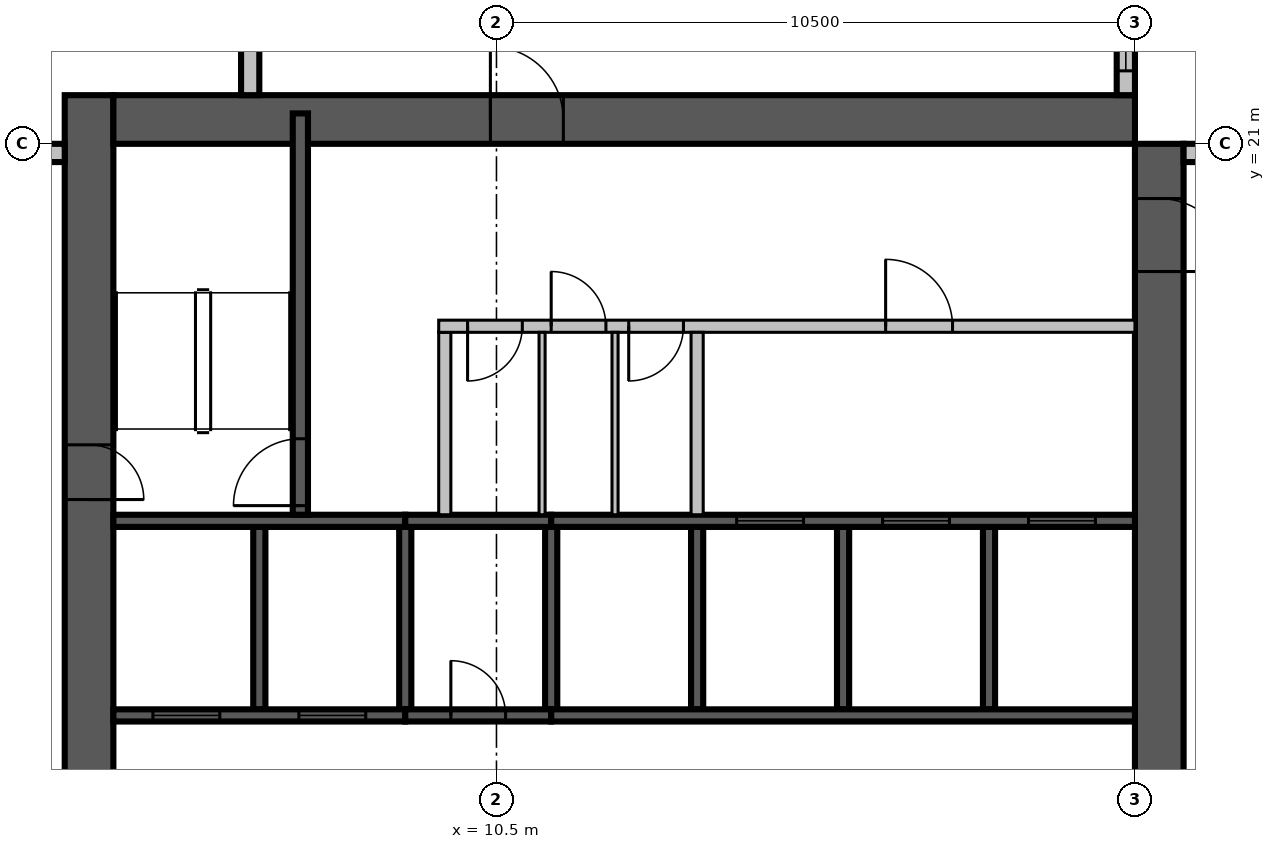
"""IFC4 building model, lengths in metres.
Left out: names, types, materials, properties, quantities, classifications, styles, units other than length and angle.
Written with IfcOpenShell. Run it as: python <this file> out.ifc"""

import sys

from ifc_helpers import new_model, si_unit, direction, frame, frame_2d, origin, place, context, subcontext, project, spatial, rectangle, extrude, source, transform, mapped, element, fill, save


model = new_model("IFC4")
c1 = context("Model", 3, precision=1e-05, world=origin(), true_north=direction((0.0, 1.0)))
c2 = subcontext(c1, "Body", "Model", "MODEL_VIEW")
j1 = project(units=[si_unit("LENGTHUNIT", "METRE"), si_unit("PLANEANGLEUNIT", "RADIAN")], contexts=[c1])
p1 = place(None, origin())
s1 = spatial("IfcSite", under=j1, at=p1, CompositionType="ELEMENT")
p2 = place(p1, origin())
s2 = spatial("IfcBuilding", under=s1, at=p2, CompositionType="ELEMENT")
p3 = place(p2, frame((0.0, 0.0, 242.4)))
s3 = spatial("IfcBuildingStorey", under=s2, at=p3, CompositionType="ELEMENT", Elevation=242.4)
m1 = source(origin(), c2, "Body", "SweptSolid", [
    extrude(rectangle(XDim=17.6, YDim=0.8, at=frame_2d((8.8, 0.0))), origin(), (0.0, 0.0, 1.0), 3.8),
])
p4 = place(p3, frame((3.8, 4.2, 0.0), z_axis=(0.0, 0.0, 1.0), x_axis=(0.0, 1.0, 0.0)))
e1 = element("IfcWall", 1, at=p4, inside=s3, PredefinedType="SHEAR", context=c2, shape_type="MappedRepresentation", body=[
    mapped(m1, transform((0.0, 0.0, 0.0), scale=1.0)),
])
m2 = source(origin(), c2, "Body", "SweptSolid", [
    extrude(rectangle(XDim=2.2, YDim=2.1, at=frame_2d((1.1, 1.05))), frame((0.0, 0.41, 0.0), z_axis=(0.0, -1.0, 0.0), x_axis=(1.0, 0.0, 0.0)), (0.0, 0.0, 1.0), 0.82),
])
p5 = place(p4, frame((4.2, 0.0, 0.0)))
e2 = element("IfcOpeningElement", 2, at=p5, cuts=e1, PredefinedType="OPENING", context=c2, shape_type="MappedRepresentation", body=[
    mapped(m2, transform((0.0, 0.0, 0.0), scale=1.0)),
])
m3 = source(origin(), c2, "Body", "SweptSolid", [
    extrude(rectangle(XDim=0.9, YDim=2.1, at=frame_2d((0.45, 1.05))), frame((0.0, 0.41, 0.0), z_axis=(0.0, -1.0, 0.0), x_axis=(1.0, 0.0, 0.0)), (0.0, 0.0, 1.0), 0.82),
])
p6 = place(p4, frame((10.95, 0.0, 0.0)))
e3 = element("IfcOpeningElement", 3, at=p6, cuts=e1, PredefinedType="OPENING", context=c2, shape_type="MappedRepresentation", body=[
    mapped(m3, transform((0.0, 0.0, 0.0), scale=1.0)),
])
m4 = source(origin(), c2, "Body", "SweptSolid", [
    extrude(rectangle(XDim=16.8, YDim=0.8, at=frame_2d((8.4, 0.0))), origin(), (0.0, 0.0, 1.0), 3.8),
])
p7 = place(p3, frame((21.4, 4.2, 0.0), z_axis=(0.0, 0.0, 1.0), x_axis=(0.0, 1.0, 0.0)))
e4 = element("IfcWall", 4, at=p7, inside=s3, PredefinedType="SHEAR", context=c2, shape_type="MappedRepresentation", body=[
    mapped(m4, transform((0.0, 0.0, 0.0), scale=1.0)),
])
p8 = place(p7, frame((4.2, 0.0, 0.0)))
e5 = element("IfcOpeningElement", 5, at=p8, cuts=e4, PredefinedType="OPENING", context=c2, shape_type="MappedRepresentation", body=[
    mapped(m2, transform((0.0, 0.0, 0.0), scale=1.0)),
])
m5 = source(origin(), c2, "Body", "SweptSolid", [
    extrude(rectangle(XDim=1.2, YDim=2.1, at=frame_2d((0.6, 1.05))), frame((0.0, 0.41, 0.0), z_axis=(0.0, -1.0, 0.0), x_axis=(1.0, 0.0, 0.0)), (0.0, 0.0, 1.0), 0.82),
])
p9 = place(p7, frame((14.7, 0.0, 0.0)))
e6 = element("IfcOpeningElement", 6, at=p9, cuts=e4, PredefinedType="OPENING", context=c2, shape_type="MappedRepresentation", body=[
    mapped(m5, transform((0.0, 0.0, 0.0), scale=1.0)),
])
p10 = place(p3, frame((4.2, 21.4, 0.0), z_axis=(0.0, 0.0, 1.0), x_axis=(1.0, 0.0, 0.0)))
e7 = element("IfcWall", 7, at=p10, inside=s3, PredefinedType="SHEAR", context=c2, shape_type="MappedRepresentation", body=[
    mapped(m4, transform((0.0, 0.0, 0.0), scale=1.0)),
])
p11 = place(p10, frame((6.2, 0.0, 0.0)))
e8 = element("IfcOpeningElement", 8, at=p11, cuts=e7, PredefinedType="OPENING", context=c2, shape_type="MappedRepresentation", body=[
    mapped(m5, transform((0.0, 0.0, 0.0), scale=1.0)),
])
m6 = source(origin(), c2, "Body", "SweptSolid", [
    extrude(rectangle(XDim=7.2, YDim=0.3, at=frame_2d((3.6, 0.0))), origin(), (0.0, 0.0, 1.0), 3.4),
])
p12 = place(p3, frame((29.0, 20.85, 0.0), z_axis=(0.0, 0.0, 1.0), x_axis=(-1.0, 0.0, 0.0)))
e9 = element("IfcWall", 9, at=p12, inside=s3, PredefinedType="STANDARD", context=c2, shape_type="MappedRepresentation", body=[
    mapped(m6, transform((0.0, 0.0, 0.0), scale=1.0)),
])
m7 = source(origin(), c2, "Body", "SweptSolid", [
    extrude(rectangle(XDim=3.0, YDim=2.3, at=frame_2d((1.5, 1.15))), frame((0.0, 0.16, 0.0), z_axis=(0.0, -1.0, 0.0), x_axis=(1.0, 0.0, 0.0)), (0.0, 0.0, 1.0), 0.32),
])
p13 = place(p12, frame((0.2, 0.0, 0.6)))
e10 = element("IfcOpeningElement", 10, at=p13, cuts=e9, PredefinedType="OPENING", context=c2, shape_type="MappedRepresentation", body=[
    mapped(m7, transform((0.0, 0.0, 0.0), scale=1.0)),
])
m8 = source(origin(), c2, "Body", "SweptSolid", [
    extrude(rectangle(XDim=1.8, YDim=2.3, at=frame_2d((0.9, 1.15))), frame((0.0, 0.16, 0.0), z_axis=(0.0, -1.0, 0.0), x_axis=(1.0, 0.0, 0.0)), (0.0, 0.0, 1.0), 0.32),
])
p14 = place(p12, frame((5.0, 0.0, 0.6)))
e11 = element("IfcOpeningElement", 11, at=p14, cuts=e9, PredefinedType="OPENING", context=c2, shape_type="MappedRepresentation", body=[
    mapped(m8, transform((0.0, 0.0, 0.0), scale=1.0)),
])
p15 = place(p3, frame((20.85, 21.8, 0.0), z_axis=(0.0, 0.0, 1.0), x_axis=(0.0, 1.0, 0.0)))
e12 = element("IfcWall", 12, at=p15, inside=s3, PredefinedType="STANDARD", context=c2, shape_type="MappedRepresentation", body=[
    mapped(m6, transform((0.0, 0.0, 0.0), scale=1.0)),
])
p16 = place(p15, frame((0.4, 0.0, 0.6)))
e13 = element("IfcOpeningElement", 13, at=p16, cuts=e12, PredefinedType="OPENING", context=c2, shape_type="MappedRepresentation", body=[
    mapped(m8, transform((0.0, 0.0, 0.0), scale=1.0)),
])
p17 = place(p15, frame((4.0, 0.0, 0.6)))
e14 = element("IfcOpeningElement", 14, at=p17, cuts=e12, PredefinedType="OPENING", context=c2, shape_type="MappedRepresentation", body=[
    mapped(m7, transform((0.0, 0.0, 0.0), scale=1.0)),
])
m9 = source(origin(), c2, "Body", "SweptSolid", [
    extrude(rectangle(XDim=16.6, YDim=0.3, at=frame_2d((8.3, 0.0))), origin(), (0.0, 0.0, 1.0), 3.4),
])
p18 = place(p3, frame((6.45, 38.4, 0.0), z_axis=(0.0, 0.0, 1.0), x_axis=(0.0, -1.0, 0.0)))
e15 = element("IfcWall", 15, at=p18, inside=s3, PredefinedType="STANDARD", context=c2, shape_type="MappedRepresentation", body=[
    mapped(m9, transform((0.0, 0.0, 0.0), scale=1.0)),
])
p19 = place(p18, frame((1.15, 0.0, 0.6)))
e16 = element("IfcOpeningElement", 16, at=p19, cuts=e15, PredefinedType="OPENING", context=c2, shape_type="MappedRepresentation", body=[
    mapped(m8, transform((0.0, 0.0, 0.0), scale=1.0)),
])
p20 = place(p18, frame((9.438, 0.0, 0.6)))
e17 = element("IfcOpeningElement", 17, at=p20, cuts=e15, PredefinedType="OPENING", context=c2, shape_type="MappedRepresentation", body=[
    mapped(m8, transform((0.0, 0.0, 0.0), scale=1.0)),
])
p21 = place(p18, frame((13.637, 0.0, 0.6)))
e18 = element("IfcOpeningElement", 18, at=p21, cuts=e15, PredefinedType="OPENING", context=c2, shape_type="MappedRepresentation", body=[
    mapped(m8, transform((0.0, 0.0, 0.0), scale=1.0)),
])
m10 = source(origin(), c2, "Body", "SweptSolid", [
    extrude(rectangle(XDim=1.0, YDim=2.1, at=frame_2d((0.5, 1.05))), frame((0.0, 0.16, 0.0), z_axis=(0.0, -1.0, 0.0), x_axis=(1.0, 0.0, 0.0)), (0.0, 0.0, 1.0), 0.32),
])
p22 = place(p18, frame((5.45, 0.0, 0.0)))
e19 = element("IfcOpeningElement", 19, at=p22, cuts=e15, PredefinedType="OPENING", context=c2, shape_type="MappedRepresentation", body=[
    mapped(m10, transform((0.0, 0.0, 0.0), scale=1.0)),
])
m11 = source(origin(), c2, "Body", "SweptSolid", [
    extrude(rectangle(XDim=2.6, YDim=0.3, at=frame_2d((1.3, 0.0))), origin(), (0.0, 0.0, 1.0), 3.4),
])
p23 = place(p3, frame((3.4, 20.85, 0.0), z_axis=(0.0, 0.0, 1.0), x_axis=(-1.0, 0.0, 0.0)))
e20 = element("IfcWall", 20, at=p23, inside=s3, PredefinedType="STANDARD", context=c2, shape_type="MappedRepresentation", body=[
    mapped(m11, transform((0.0, 0.0, 0.0), scale=1.0)),
])
p24 = place(p23, frame((0.4, 0.0, 0.6)))
e21 = element("IfcOpeningElement", 21, at=p24, cuts=e20, PredefinedType="OPENING", context=c2, shape_type="MappedRepresentation", body=[
    mapped(m8, transform((0.0, 0.0, 0.0), scale=1.0)),
])
m12 = source(origin(), c2, "Body", "SweptSolid", [
    extrude(rectangle(XDim=3.0, YDim=0.2, at=frame_2d((1.5, 0.0))), origin(), (0.0, 0.0, 1.0), 3.8),
])
p25 = place(p3, frame((6.6, 11.7, 0.0), z_axis=(0.0, 0.0, 1.0), x_axis=(0.0, 1.0, 0.0)))
e22 = element("IfcWall", 22, at=p25, inside=s3, PredefinedType="SOLIDWALL", context=c2, shape_type="MappedRepresentation", body=[
    mapped(m12, transform((0.0, 0.0, 0.0), scale=1.0)),
])
m13 = source(origin(), c2, "Body", "SweptSolid", [
    extrude(rectangle(XDim=3.0, YDim=0.2, at=frame_2d((1.5, 0.0))), origin(), (0.0, 0.0, 1.0), 3.4),
])
for number, where, z_axis, x_axis in (
    (23, (9.0, 11.7, 0.0), (0.0, 0.0, 1.0), (0.0, 1.0, 0.0)),
    (24, (11.4, 11.7, 0.0), (0.0, 0.0, 1.0), (0.0, 1.0, 0.0)),
):
    element("IfcWall", number, at=place(p3, frame(where, z_axis=z_axis, x_axis=x_axis)), inside=s3, PredefinedType="SOLIDWALL", context=c2, shape_type="MappedRepresentation", body=[
        mapped(m13, transform((0.0, 0.0, 0.0), scale=1.0)),
    ])
for number, where, z_axis, x_axis in (
    (25, (13.8, 11.7, 0.0), (0.0, 0.0, 1.0), (0.0, 1.0, 0.0)),
    (26, (16.2, 11.7, 0.0), (0.0, 0.0, 1.0), (0.0, 1.0, 0.0)),
    (27, (18.6, 11.7, 0.0), (0.0, 0.0, 1.0), (0.0, 1.0, 0.0)),
):
    element("IfcWall", number, at=place(p3, frame(where, z_axis=z_axis, x_axis=x_axis)), inside=s3, PredefinedType="SOLIDWALL", context=c2, shape_type="MappedRepresentation", body=[
        mapped(m12, transform((0.0, 0.0, 0.0), scale=1.0)),
    ])
m14 = source(origin(), c2, "Body", "SweptSolid", [
    extrude(rectangle(XDim=4.8, YDim=0.2, at=frame_2d((2.4, 0.0))), origin(), (0.0, 0.0, 1.0), 3.8),
])
p26 = place(p3, frame((4.2, 11.6, 0.0), z_axis=(0.0, 0.0, 1.0), x_axis=(1.0, 0.0, 0.0)))
e28 = element("IfcWall", 28, at=p26, inside=s3, PredefinedType="SOLIDWALL", context=c2, shape_type="MappedRepresentation", body=[
    mapped(m14, transform((0.0, 0.0, 0.0), scale=1.0)),
])
m15 = source(origin(), c2, "Body", "SweptSolid", [
    extrude(rectangle(XDim=1.1, YDim=2.1, at=frame_2d((0.55, 1.05))), frame((0.0, 0.11, 0.0), z_axis=(0.0, -1.0, 0.0), x_axis=(1.0, 0.0, 0.0)), (0.0, 0.0, 1.0), 0.22),
])
p27 = place(p26, frame((0.65, 0.0, 0.0)))
e29 = element("IfcOpeningElement", 29, at=p27, cuts=e28, PredefinedType="OPENING", context=c2, shape_type="MappedRepresentation", body=[
    mapped(m15, transform((0.0, 0.0, 0.0), scale=1.0)),
])
p28 = place(p26, frame((3.05, 0.0, 0.0)))
e30 = element("IfcOpeningElement", 30, at=p28, cuts=e28, PredefinedType="OPENING", context=c2, shape_type="MappedRepresentation", body=[
    mapped(m15, transform((0.0, 0.0, 0.0), scale=1.0)),
])
m16 = source(origin(), c2, "Body", "SweptSolid", [
    extrude(rectangle(XDim=2.4, YDim=0.2, at=frame_2d((1.2, 0.0))), origin(), (0.0, 0.0, 1.0), 3.4),
])
p29 = place(p3, frame((9.0, 11.6, 0.0), z_axis=(0.0, 0.0, 1.0), x_axis=(1.0, 0.0, 0.0)))
e31 = element("IfcWall", 31, at=p29, inside=s3, PredefinedType="SOLIDWALL", context=c2, shape_type="MappedRepresentation", body=[
    mapped(m16, transform((0.0, 0.0, 0.0), scale=1.0)),
])
m17 = source(origin(), c2, "Body", "SweptSolid", [
    extrude(rectangle(XDim=0.9, YDim=2.1, at=frame_2d((0.45, 1.05))), frame((0.0, 0.11, 0.0), z_axis=(0.0, -1.0, 0.0), x_axis=(1.0, 0.0, 0.0)), (0.0, 0.0, 1.0), 0.22),
])
p30 = place(p29, frame((0.75, 0.0, 0.0)))
e32 = element("IfcOpeningElement", 32, at=p30, cuts=e31, PredefinedType="OPENING", context=c2, shape_type="MappedRepresentation", body=[
    mapped(m17, transform((0.0, 0.0, 0.0), scale=1.0)),
])
m18 = source(origin(), c2, "Body", "SweptSolid", [
    extrude(rectangle(XDim=9.6, YDim=0.2, at=frame_2d((4.8, 0.0))), origin(), (0.0, 0.0, 1.0), 3.8),
])
p31 = place(p3, frame((11.4, 11.6, 0.0), z_axis=(0.0, 0.0, 1.0), x_axis=(1.0, 0.0, 0.0)))
e33 = element("IfcWall", 33, at=p31, inside=s3, PredefinedType="SOLIDWALL", context=c2, shape_type="MappedRepresentation", body=[
    mapped(m18, transform((0.0, 0.0, 0.0), scale=1.0)),
])
p32 = place(p3, frame((4.2, 14.8, 0.0), z_axis=(0.0, 0.0, 1.0), x_axis=(1.0, 0.0, 0.0)))
e34 = element("IfcWall", 34, at=p32, inside=s3, PredefinedType="SOLIDWALL", context=c2, shape_type="MappedRepresentation", body=[
    mapped(m14, transform((0.0, 0.0, 0.0), scale=1.0)),
])
p33 = place(p3, frame((9.0, 14.8, 0.0), z_axis=(0.0, 0.0, 1.0), x_axis=(1.0, 0.0, 0.0)))
e35 = element("IfcWall", 35, at=p33, inside=s3, PredefinedType="SOLIDWALL", context=c2, shape_type="MappedRepresentation", body=[
    mapped(m16, transform((0.0, 0.0, 0.0), scale=1.0)),
])
p34 = place(p3, frame((11.4, 14.8, 0.0), z_axis=(0.0, 0.0, 1.0), x_axis=(1.0, 0.0, 0.0)))
e36 = element("IfcWall", 36, at=p34, inside=s3, PredefinedType="SOLIDWALL", context=c2, shape_type="MappedRepresentation", body=[
    mapped(m18, transform((0.0, 0.0, 0.0), scale=1.0)),
])
p35 = place(p34, frame((3.05, 0.0, 0.0)))
e37 = element("IfcOpeningElement", 37, at=p35, cuts=e36, PredefinedType="OPENING", context=c2, shape_type="MappedRepresentation", body=[
    mapped(m15, transform((0.0, 0.0, 0.0), scale=1.0)),
])
p36 = place(p34, frame((5.45, 0.0, 0.0)))
e38 = element("IfcOpeningElement", 38, at=p36, cuts=e36, PredefinedType="OPENING", context=c2, shape_type="MappedRepresentation", body=[
    mapped(m15, transform((0.0, 0.0, 0.0), scale=1.0)),
])
p37 = place(p34, frame((7.85, 0.0, 0.0)))
e39 = element("IfcOpeningElement", 39, at=p37, cuts=e36, PredefinedType="OPENING", context=c2, shape_type="MappedRepresentation", body=[
    mapped(m15, transform((0.0, 0.0, 0.0), scale=1.0)),
])
m19 = source(origin(), c2, "Body", "SweptSolid", [
    extrude(rectangle(XDim=6.6, YDim=0.25, at=frame_2d((3.3, 0.0))), origin(), (0.0, 0.0, 1.0), 3.4),
])
p38 = place(p3, frame((7.275, 14.9, 0.0), z_axis=(0.0, 0.0, 1.0), x_axis=(0.0, 1.0, 0.0)))
e40 = element("IfcWall", 40, at=p38, inside=s3, PredefinedType="SOLIDWALL", context=c2, shape_type="MappedRepresentation", body=[
    mapped(m19, transform((0.0, 0.0, 0.0), scale=1.0)),
])
m20 = source(origin(), c2, "Body", "SweptSolid", [
    extrude(rectangle(XDim=1.1, YDim=2.1, at=frame_2d((0.55, 1.05))), frame((0.0, 0.135, 0.0), z_axis=(0.0, -1.0, 0.0), x_axis=(1.0, 0.0, 0.0)), (0.0, 0.0, 1.0), 0.27),
])
p39 = place(p38, frame((0.15, 0.0, 0.0)))
e41 = element("IfcOpeningElement", 41, at=p39, cuts=e40, PredefinedType="OPENING", context=c2, shape_type="MappedRepresentation", body=[
    mapped(m20, transform((0.0, 0.0, 0.0), scale=1.0)),
])
m21 = source(origin(), c2, "Body", "SweptSolid", [
    extrude(rectangle(XDim=3.0, YDim=0.2, at=frame_2d((1.5, 0.0))), origin(), (0.0, 0.0, 1.0), 3.4),
])
p40 = place(p3, frame((9.65, 14.9, 0.0), z_axis=(0.0, 0.0, 1.0), x_axis=(0.0, 1.0, 0.0)))
e42 = element("IfcWall", 42, at=p40, inside=s3, PredefinedType="PARTITIONING", context=c2, shape_type="MappedRepresentation", body=[
    mapped(m21, transform((0.0, 0.0, 0.0), scale=1.0)),
])
m22 = source(origin(), c2, "Body", "SweptSolid", [
    extrude(rectangle(XDim=11.45, YDim=0.2, at=frame_2d((5.725, 0.0))), origin(), (0.0, 0.0, 1.0), 3.4),
])
p41 = place(p3, frame((9.55, 18.0, 0.0), z_axis=(0.0, 0.0, 1.0), x_axis=(1.0, 0.0, 0.0)))
e43 = element("IfcWall", 43, at=p41, inside=s3, PredefinedType="PARTITIONING", context=c2, shape_type="MappedRepresentation", body=[
    mapped(m22, transform((0.0, 0.0, 0.0), scale=1.0)),
])
p42 = place(p41, frame((0.475, 0.0, 0.0)))
e44 = element("IfcOpeningElement", 44, at=p42, cuts=e43, PredefinedType="OPENING", context=c2, shape_type="MappedRepresentation", body=[
    mapped(m17, transform((0.0, 0.0, 0.0), scale=1.0)),
])
p43 = place(p41, frame((1.85, 0.0, 0.0)))
e45 = element("IfcOpeningElement", 45, at=p43, cuts=e43, PredefinedType="OPENING", context=c2, shape_type="MappedRepresentation", body=[
    mapped(m17, transform((0.0, 0.0, 0.0), scale=1.0)),
])
p44 = place(p41, frame((3.125, 0.0, 0.0)))
e46 = element("IfcOpeningElement", 46, at=p44, cuts=e43, PredefinedType="OPENING", context=c2, shape_type="MappedRepresentation", body=[
    mapped(m17, transform((0.0, 0.0, 0.0), scale=1.0)),
])
p45 = place(p41, frame((7.35, 0.0, 0.0)))
e47 = element("IfcOpeningElement", 47, at=p45, cuts=e43, PredefinedType="OPENING", context=c2, shape_type="MappedRepresentation", body=[
    mapped(m15, transform((0.0, 0.0, 0.0), scale=1.0)),
])
p46 = place(p3, frame((13.8, 14.9, 0.0), z_axis=(0.0, 0.0, 1.0), x_axis=(0.0, 1.0, 0.0)))
e48 = element("IfcWall", 48, at=p46, inside=s3, PredefinedType="PARTITIONING", context=c2, shape_type="MappedRepresentation", body=[
    mapped(m21, transform((0.0, 0.0, 0.0), scale=1.0)),
])
m23 = source(origin(), c2, "Body", "SweptSolid", [
    extrude(rectangle(XDim=3.0, YDim=0.1, at=frame_2d((1.5, 0.0))), origin(), (0.0, 0.0, 1.0), 3.4),
])
for number, where, z_axis, x_axis in (
    (49, (11.25, 14.9, 0.0), (0.0, 0.0, 1.0), (0.0, 1.0, 0.0)),
    (50, (12.45, 14.9, 0.0), (0.0, 0.0, 1.0), (0.0, 1.0, 0.0)),
):
    element("IfcWall", number, at=place(p3, frame(where, z_axis=z_axis, x_axis=x_axis)), inside=s3, PredefinedType="PARTITIONING", context=c2, shape_type="MappedRepresentation", body=[
        mapped(m23, transform((0.0, 0.0, 0.0), scale=1.0)),
    ])
m24 = source(origin(), c2, "Body", "SweptSolid", [
    extrude(rectangle(XDim=1.8, YDim=2.3, at=frame_2d((0.9, 1.15))), frame((0.0, 0.03, 0.0), z_axis=(0.0, -1.0, 0.0), x_axis=(1.0, 0.0, 0.0)), (0.0, 0.0, 1.0), 0.06),
])
p47 = place(p16, origin())
e51 = element("IfcWindow", 51, at=p47, inside=s3, PartitioningType="SINGLE_PANEL", PredefinedType="WINDOW", context=c2, shape_type="MappedRepresentation", body=[
    mapped(m24, transform((0.0, 0.0, 0.0), scale=1.0)),
])
fill(e13, e51)
m25 = source(origin(), c2, "Body", "SweptSolid", [
    extrude(rectangle(XDim=1.1, YDim=2.1, at=frame_2d((0.55, 1.05))), frame((0.0, 0.025, 0.0), z_axis=(0.0, -1.0, 0.0), x_axis=(1.0, 0.0, 0.0)), (0.0, 0.0, 1.0), 0.05),
])
p48 = place(p27, origin())
e52 = element("IfcDoor", 52, at=p48, inside=s3, OperationType="SLIDING_TO_LEFT", PredefinedType="DOOR", context=c2, shape_type="MappedRepresentation", body=[
    mapped(m25, transform((0.0, 0.0, 0.0), scale=1.0)),
])
fill(e29, e52)
p49 = place(p28, origin())
e53 = element("IfcDoor", 53, at=p49, inside=s3, OperationType="SLIDING_TO_LEFT", PredefinedType="DOOR", context=c2, shape_type="MappedRepresentation", body=[
    mapped(m25, transform((0.0, 0.0, 0.0), scale=1.0)),
])
fill(e30, e53)
m26 = source(origin(), c2, "Body", "SweptSolid", [
    extrude(rectangle(XDim=0.9, YDim=2.1, at=frame_2d((0.45, 1.05))), frame((0.0, 0.025, 0.0), z_axis=(0.0, -1.0, 0.0), x_axis=(1.0, 0.0, 0.0)), (0.0, 0.0, 1.0), 0.05),
])
p50 = place(p30, origin())
e54 = element("IfcDoor", 54, at=p50, inside=s3, OperationType="SINGLE_SWING_LEFT", PredefinedType="DOOR", context=c2, shape_type="MappedRepresentation", body=[
    mapped(m26, transform((0.0, 0.0, 0.0), scale=1.0)),
])
fill(e32, e54)
p51 = place(p35, origin())
e55 = element("IfcDoor", 55, at=p51, inside=s3, OperationType="SLIDING_TO_LEFT", PredefinedType="DOOR", context=c2, shape_type="MappedRepresentation", body=[
    mapped(m25, transform((0.0, 0.0, 0.0), scale=1.0)),
])
fill(e37, e55)
p52 = place(p36, origin())
e56 = element("IfcDoor", 56, at=p52, inside=s3, OperationType="SLIDING_TO_LEFT", PredefinedType="DOOR", context=c2, shape_type="MappedRepresentation", body=[
    mapped(m25, transform((0.0, 0.0, 0.0), scale=1.0)),
])
fill(e38, e56)
p53 = place(p37, origin())
e57 = element("IfcDoor", 57, at=p53, inside=s3, OperationType="SLIDING_TO_LEFT", PredefinedType="DOOR", context=c2, shape_type="MappedRepresentation", body=[
    mapped(m25, transform((0.0, 0.0, 0.0), scale=1.0)),
])
fill(e39, e57)
p54 = place(p39, origin())
e58 = element("IfcDoor", 58, at=p54, inside=s3, OperationType="SINGLE_SWING_LEFT", PredefinedType="DOOR", context=c2, shape_type="MappedRepresentation", body=[
    mapped(m25, transform((0.0, 0.0, 0.0), scale=1.0)),
])
fill(e41, e58)
p55 = place(p42, origin())
e59 = element("IfcDoor", 59, at=p55, inside=s3, OperationType="SINGLE_SWING_RIGHT", PredefinedType="DOOR", context=c2, shape_type="MappedRepresentation", body=[
    mapped(m26, transform((0.0, 0.0, 0.0), scale=1.0)),
])
fill(e44, e59)
p56 = place(p43, origin())
e60 = element("IfcDoor", 60, at=p56, inside=s3, OperationType="SINGLE_SWING_LEFT", PredefinedType="DOOR", context=c2, shape_type="MappedRepresentation", body=[
    mapped(m26, transform((0.0, 0.0, 0.0), scale=1.0)),
])
fill(e45, e60)
p57 = place(p44, origin())
e61 = element("IfcDoor", 61, at=p57, inside=s3, OperationType="SINGLE_SWING_RIGHT", PredefinedType="DOOR", context=c2, shape_type="MappedRepresentation", body=[
    mapped(m26, transform((0.0, 0.0, 0.0), scale=1.0)),
])
fill(e46, e61)
p58 = place(p45, origin())
e62 = element("IfcDoor", 62, at=p58, inside=s3, OperationType="SINGLE_SWING_LEFT", PredefinedType="DOOR", context=c2, shape_type="MappedRepresentation", body=[
    mapped(m25, transform((0.0, 0.0, 0.0), scale=1.0)),
])
fill(e47, e62)
m27 = source(origin(), c2, "Body", "SweptSolid", [
    extrude(rectangle(XDim=1.2, YDim=2.1, at=frame_2d((0.6, 1.05))), frame((0.0, 0.025, 0.0), z_axis=(0.0, -1.0, 0.0), x_axis=(1.0, 0.0, 0.0)), (0.0, 0.0, 1.0), 0.05),
])
p59 = place(p11, origin())
e63 = element("IfcDoor", 63, at=p59, inside=s3, OperationType="SINGLE_SWING_LEFT", PredefinedType="DOOR", context=c2, shape_type="MappedRepresentation", body=[
    mapped(m27, transform((0.0, 0.0, 0.0), scale=1.0)),
])
fill(e8, e63)
p60 = place(p9, origin())
e64 = element("IfcDoor", 64, at=p60, inside=s3, OperationType="SINGLE_SWING_RIGHT", PredefinedType="DOOR", context=c2, shape_type="MappedRepresentation", body=[
    mapped(m27, transform((0.0, 0.0, 0.0), scale=1.0)),
])
fill(e6, e64)
p61 = place(p6, origin())
e65 = element("IfcDoor", 65, at=p61, inside=s3, OperationType="SINGLE_SWING_RIGHT", PredefinedType="DOOR", context=c2, shape_type="MappedRepresentation", body=[
    mapped(m26, transform((0.0, 0.0, 0.0), scale=1.0)),
])
fill(e3, e65)
save(model, sys.argv[1])
